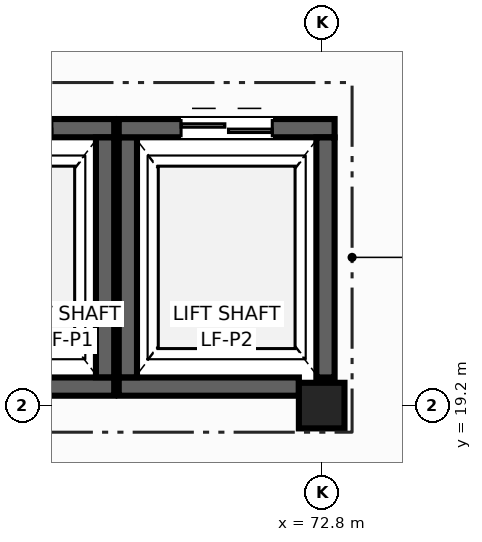
"""IFC4 building model, lengths in metres.
Left out: names, types, materials, properties, quantities, classifications, styles, units other than length and angle.
Written with IfcOpenShell. Run it as: python <this file> out.ifc"""

import sys

from ifc_helpers import new_model, si_unit, direction, frame, frame_2d, origin, origin_2d, place, context, subcontext, project, spatial, rectangle, extrude, element, fill, save


model = new_model("IFC4")
c1 = context("Model", 3, precision=1e-05, world=origin(), true_north=direction((0.0, 1.0)))
c2 = subcontext(c1, "Body", "Model", "MODEL_VIEW")
j1 = project(units=[si_unit("LENGTHUNIT", "METRE"), si_unit("PLANEANGLEUNIT", "RADIAN")], contexts=[c1])
p1 = place(None, origin())
s1 = spatial("IfcSite", under=j1, at=p1, CompositionType="ELEMENT")
p2 = place(p1, origin())
s2 = spatial("IfcBuilding", under=s1, at=p2, CompositionType="ELEMENT")
p3 = place(p2, frame((0.0, 0.0, 9.9)))
s3 = spatial("IfcBuildingStorey", under=s2, at=p3, CompositionType="ELEMENT", Elevation=9.9)
p4 = place(p3, frame((72.8, 19.2, 0.0), z_axis=(0.0, 0.0, 1.0), x_axis=(1.0, 0.0, 0.0)))
e1 = element("IfcColumn", 1, at=p4, inside=s3, PredefinedType="COLUMN", context=c2, shape_type="SweptSolid", body=[
    extrude(rectangle(XDim=0.6, YDim=0.6, at=origin_2d()), origin(), (0.0, 0.0, 1.0), 4.5),
])
p5 = place(p3, frame((70.07, 19.45, 0.0), z_axis=(0.0, 0.0, 1.0), x_axis=(-1.0, 0.0, 0.0)))
e2 = element("IfcWall", 2, at=p5, inside=s3, PredefinedType="SHEAR", context=c2, shape_type="SweptSolid", body=[
    extrude(rectangle(XDim=2.84, YDim=0.24, at=frame_2d((1.42, 0.0))), origin(), (0.0, 0.0, 1.0), 4.22),
])
p6 = place(p3, frame((67.23, 22.85, 0.0), z_axis=(0.0, 0.0, 1.0), x_axis=(1.0, 0.0, 0.0)))
e3 = element("IfcWall", 3, at=p6, inside=s3, PredefinedType="SHEAR", context=c2, shape_type="SweptSolid", body=[
    extrude(rectangle(XDim=2.84, YDim=0.24, at=frame_2d((1.42, 0.0))), origin(), (0.0, 0.0, 1.0), 4.22),
])
p7 = place(p6, frame((0.82, 0.0, 0.0)))
e4 = element("IfcOpeningElement", 4, at=p7, cuts=e3, PredefinedType="OPENING", context=c2, shape_type="SweptSolid", body=[
    extrude(rectangle(XDim=1.2, YDim=2.15, at=frame_2d((0.6, 1.075))), frame((0.0, 0.13, 0.0), z_axis=(0.0, -1.0, 0.0), x_axis=(1.0, 0.0, 0.0)), (0.0, 0.0, 1.0), 0.26),
])
p8 = place(p3, frame((69.95, 22.728, 0.0), z_axis=(0.0, 0.0, 1.0), x_axis=(0.0, -1.0, 0.0)))
e5 = element("IfcWall", 5, at=p8, inside=s3, PredefinedType="SHEAR", context=c2, shape_type="SweptSolid", body=[
    extrude(rectangle(XDim=3.156, YDim=0.24, at=frame_2d((1.578, 0.0))), origin(), (0.0, 0.0, 1.0), 4.22),
])
p9 = place(p3, frame((72.5, 19.45, 0.0), z_axis=(0.0, 0.0, 1.0), x_axis=(-1.0, 0.0, 0.0)))
e6 = element("IfcWall", 6, at=p9, inside=s3, PredefinedType="SHEAR", context=c2, shape_type="SweptSolid", body=[
    extrude(rectangle(XDim=2.37, YDim=0.24, at=frame_2d((1.185, 0.0))), origin(), (0.0, 0.0, 1.0), 4.22),
])
p10 = place(p3, frame((70.25, 19.572, 0.0), z_axis=(0.0, 0.0, 1.0), x_axis=(0.0, 1.0, 0.0)))
e7 = element("IfcWall", 7, at=p10, inside=s3, PredefinedType="SHEAR", context=c2, shape_type="SweptSolid", body=[
    extrude(rectangle(XDim=3.158, YDim=0.24, at=frame_2d((1.579, 0.0))), origin(), (0.0, 0.0, 1.0), 4.22),
])
p11 = place(p3, frame((70.13, 22.85, 0.0), z_axis=(0.0, 0.0, 1.0), x_axis=(1.0, 0.0, 0.0)))
e8 = element("IfcWall", 8, at=p11, inside=s3, PredefinedType="SHEAR", context=c2, shape_type="SweptSolid", body=[
    extrude(rectangle(XDim=2.84, YDim=0.24, at=frame_2d((1.42, 0.0))), origin(), (0.0, 0.0, 1.0), 4.22),
])
p12 = place(p11, frame((0.82, 0.0, 0.0)))
e9 = element("IfcOpeningElement", 9, at=p12, cuts=e8, PredefinedType="OPENING", context=c2, shape_type="SweptSolid", body=[
    extrude(rectangle(XDim=1.2, YDim=2.15, at=frame_2d((0.6, 1.075))), frame((0.0, 0.13, 0.0), z_axis=(0.0, -1.0, 0.0), x_axis=(1.0, 0.0, 0.0)), (0.0, 0.0, 1.0), 0.26),
])
p13 = place(p3, frame((72.85, 22.728, 0.0), z_axis=(0.0, 0.0, 1.0), x_axis=(0.0, -1.0, 0.0)))
e10 = element("IfcWall", 10, at=p13, inside=s3, PredefinedType="SHEAR", context=c2, shape_type="SweptSolid", body=[
    extrude(rectangle(XDim=3.158, YDim=0.24, at=frame_2d((1.579, 0.0))), origin(), (0.0, 0.0, 1.0), 4.22),
])
p14 = place(p7, origin())
e11 = element("IfcDoor", 11, at=p14, inside=s3, OperationType="DOUBLE_DOOR_SLIDING", PredefinedType="DOOR", context=c2, shape_type="SweptSolid", body=[
    extrude(rectangle(XDim=1.2, YDim=2.15, at=frame_2d((0.6, 1.075))), frame((0.0, 0.025, 0.0), z_axis=(0.0, -1.0, 0.0), x_axis=(1.0, 0.0, 0.0)), (0.0, 0.0, 1.0), 0.05),
])
fill(e4, e11)
p15 = place(p12, origin())
e12 = element("IfcDoor", 12, at=p15, inside=s3, OperationType="DOUBLE_DOOR_SLIDING", PredefinedType="DOOR", context=c2, shape_type="SweptSolid", body=[
    extrude(rectangle(XDim=1.2, YDim=2.15, at=frame_2d((0.6, 1.075))), frame((0.0, 0.025, 0.0), z_axis=(0.0, -1.0, 0.0), x_axis=(1.0, 0.0, 0.0)), (0.0, 0.0, 1.0), 0.05),
])
fill(e9, e12)
save(model, sys.argv[1])
